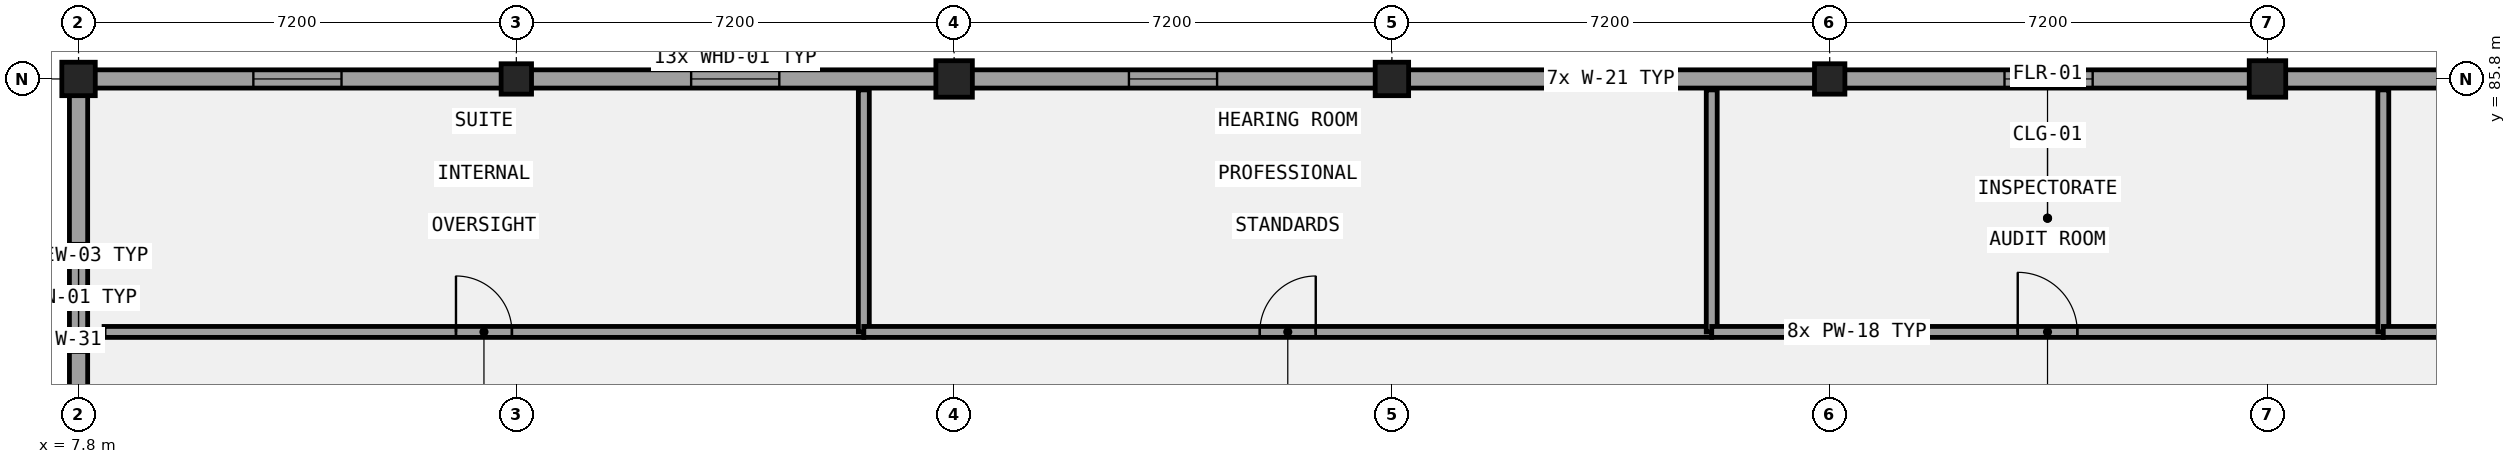
"""IFC4 building model, lengths in metres.
Left out: names, types, materials, properties, quantities, classifications, styles, units other than length and angle.
Written with IfcOpenShell. Run it as: python <this file> out.ifc"""

import sys

from ifc_helpers import new_model, si_unit, direction, frame, frame_2d, origin, origin_2d, place, context, subcontext, project, spatial, rectangle, extrude, element, fill, save


model = new_model("IFC4")
c1 = context("Model", 3, precision=1e-05, world=origin(), true_north=direction((0.0, 1.0)))
c2 = subcontext(c1, "Body", "Model", "MODEL_VIEW")
j1 = project(units=[si_unit("LENGTHUNIT", "METRE"), si_unit("PLANEANGLEUNIT", "RADIAN")], contexts=[c1])
p1 = place(None, origin())
s1 = spatial("IfcSite", under=j1, at=p1, CompositionType="ELEMENT")
p2 = place(p1, origin())
s2 = spatial("IfcBuilding", under=s1, at=p2, CompositionType="ELEMENT")
p3 = place(p2, frame((0.0, 0.0, 22.2)))
s3 = spatial("IfcBuildingStorey", under=s2, at=p3, CompositionType="ELEMENT", Elevation=22.2)
p4 = place(p3, frame((7.8, 85.8, 0.0), z_axis=(0.0, 0.0, 1.0), x_axis=(1.0, 0.0, 0.0)))
e1 = element("IfcColumn", 1, at=p4, inside=s3, PredefinedType="COLUMN", context=c2, shape_type="SweptSolid", body=[
    extrude(rectangle(XDim=0.55, YDim=0.55, at=origin_2d()), origin(), (0.0, 0.0, 1.0), 4.2),
])
p5 = place(p3, frame((15.0, 85.8, 0.0), z_axis=(0.0, 0.0, 1.0), x_axis=(1.0, 0.0, 0.0)))
e2 = element("IfcColumn", 2, at=p5, inside=s3, PredefinedType="COLUMN", context=c2, shape_type="SweptSolid", body=[
    extrude(rectangle(XDim=0.5, YDim=0.5, at=origin_2d()), origin(), (0.0, 0.0, 1.0), 4.2),
])
p6 = place(p3, frame((22.2, 85.8, 0.0), z_axis=(0.0, 0.0, 1.0), x_axis=(1.0, 0.0, 0.0)))
e3 = element("IfcColumn", 3, at=p6, inside=s3, PredefinedType="COLUMN", context=c2, shape_type="SweptSolid", body=[
    extrude(rectangle(XDim=0.6, YDim=0.6, at=origin_2d()), origin(), (0.0, 0.0, 1.0), 4.2),
])
p7 = place(p3, frame((29.4, 85.8, 0.0), z_axis=(0.0, 0.0, 1.0), x_axis=(1.0, 0.0, 0.0)))
e4 = element("IfcColumn", 4, at=p7, inside=s3, PredefinedType="COLUMN", context=c2, shape_type="SweptSolid", body=[
    extrude(rectangle(XDim=0.55, YDim=0.55, at=origin_2d()), origin(), (0.0, 0.0, 1.0), 4.2),
])
p8 = place(p3, frame((36.6, 85.8, 0.0), z_axis=(0.0, 0.0, 1.0), x_axis=(1.0, 0.0, 0.0)))
e5 = element("IfcColumn", 5, at=p8, inside=s3, PredefinedType="COLUMN", context=c2, shape_type="SweptSolid", body=[
    extrude(rectangle(XDim=0.5, YDim=0.5, at=origin_2d()), origin(), (0.0, 0.0, 1.0), 4.2),
])
p9 = place(p3, frame((43.8, 85.8, 0.0), z_axis=(0.0, 0.0, 1.0), x_axis=(1.0, 0.0, 0.0)))
e6 = element("IfcColumn", 6, at=p9, inside=s3, PredefinedType="COLUMN", context=c2, shape_type="SweptSolid", body=[
    extrude(rectangle(XDim=0.6, YDim=0.6, at=origin_2d()), origin(), (0.0, 0.0, 1.0), 4.2),
])
p10 = place(p3, frame((108.75, 85.8, 0.0), z_axis=(0.0, 0.0, 1.0), x_axis=(-1.0, 0.0, 0.0)))
e7 = element("IfcWall", 7, at=p10, inside=s3, PredefinedType="SOLIDWALL", context=c2, shape_type="SweptSolid", body=[
    extrude(rectangle(XDim=101.1, YDim=0.3, at=frame_2d((50.55, 0.0))), origin(), (0.0, 0.0, 1.0), 2.92),
])
p11 = place(p10, frame((96.625, 0.0, 1.0)))
e8 = element("IfcOpeningElement", 8, at=p11, cuts=e7, PredefinedType="OPENING", context=c2, shape_type="SweptSolid", body=[
    extrude(rectangle(XDim=1.45, YDim=1.4, at=frame_2d((0.725, 0.7))), frame((0.0, 0.16, 0.0), z_axis=(0.0, -1.0, 0.0), x_axis=(1.0, 0.0, 0.0)), (0.0, 0.0, 1.0), 0.32),
])
p12 = place(p10, frame((89.425, 0.0, 1.0)))
e9 = element("IfcOpeningElement", 9, at=p12, cuts=e7, PredefinedType="OPENING", context=c2, shape_type="SweptSolid", body=[
    extrude(rectangle(XDim=1.45, YDim=1.4, at=frame_2d((0.725, 0.7))), frame((0.0, 0.16, 0.0), z_axis=(0.0, -1.0, 0.0), x_axis=(1.0, 0.0, 0.0)), (0.0, 0.0, 1.0), 0.32),
])
p13 = place(p10, frame((82.225, 0.0, 1.0)))
e10 = element("IfcOpeningElement", 10, at=p13, cuts=e7, PredefinedType="OPENING", context=c2, shape_type="SweptSolid", body=[
    extrude(rectangle(XDim=1.45, YDim=1.4, at=frame_2d((0.725, 0.7))), frame((0.0, 0.16, 0.0), z_axis=(0.0, -1.0, 0.0), x_axis=(1.0, 0.0, 0.0)), (0.0, 0.0, 1.0), 0.32),
])
p14 = place(p10, frame((75.025, 0.0, 1.0)))
e11 = element("IfcOpeningElement", 11, at=p14, cuts=e7, PredefinedType="OPENING", context=c2, shape_type="SweptSolid", body=[
    extrude(rectangle(XDim=1.45, YDim=1.4, at=frame_2d((0.725, 0.7))), frame((0.0, 0.16, 0.0), z_axis=(0.0, -1.0, 0.0), x_axis=(1.0, 0.0, 0.0)), (0.0, 0.0, 1.0), 0.32),
])
p15 = place(p10, frame((67.825, 0.0, 1.0)))
e12 = element("IfcOpeningElement", 12, at=p15, cuts=e7, PredefinedType="OPENING", context=c2, shape_type="SweptSolid", body=[
    extrude(rectangle(XDim=1.45, YDim=1.4, at=frame_2d((0.725, 0.7))), frame((0.0, 0.16, 0.0), z_axis=(0.0, -1.0, 0.0), x_axis=(1.0, 0.0, 0.0)), (0.0, 0.0, 1.0), 0.32),
])
p16 = place(p10, frame((60.625, 0.0, 1.0)))
e13 = element("IfcOpeningElement", 13, at=p16, cuts=e7, PredefinedType="OPENING", context=c2, shape_type="SweptSolid", body=[
    extrude(rectangle(XDim=1.45, YDim=1.4, at=frame_2d((0.725, 0.7))), frame((0.0, 0.16, 0.0), z_axis=(0.0, -1.0, 0.0), x_axis=(1.0, 0.0, 0.0)), (0.0, 0.0, 1.0), 0.32),
])
p17 = place(p10, frame((53.425, 0.0, 1.0)))
e14 = element("IfcOpeningElement", 14, at=p17, cuts=e7, PredefinedType="OPENING", context=c2, shape_type="SweptSolid", body=[
    extrude(rectangle(XDim=1.45, YDim=1.4, at=frame_2d((0.725, 0.7))), frame((0.0, 0.16, 0.0), z_axis=(0.0, -1.0, 0.0), x_axis=(1.0, 0.0, 0.0)), (0.0, 0.0, 1.0), 0.32),
])
p18 = place(p10, frame((46.225, 0.0, 1.0)))
e15 = element("IfcOpeningElement", 15, at=p18, cuts=e7, PredefinedType="OPENING", context=c2, shape_type="SweptSolid", body=[
    extrude(rectangle(XDim=1.45, YDim=1.4, at=frame_2d((0.725, 0.7))), frame((0.0, 0.16, 0.0), z_axis=(0.0, -1.0, 0.0), x_axis=(1.0, 0.0, 0.0)), (0.0, 0.0, 1.0), 0.32),
])
p19 = place(p10, frame((39.025, 0.0, 1.0)))
e16 = element("IfcOpeningElement", 16, at=p19, cuts=e7, PredefinedType="OPENING", context=c2, shape_type="SweptSolid", body=[
    extrude(rectangle(XDim=1.45, YDim=1.4, at=frame_2d((0.725, 0.7))), frame((0.0, 0.16, 0.0), z_axis=(0.0, -1.0, 0.0), x_axis=(1.0, 0.0, 0.0)), (0.0, 0.0, 1.0), 0.32),
])
p20 = place(p10, frame((31.825, 0.0, 1.0)))
e17 = element("IfcOpeningElement", 17, at=p20, cuts=e7, PredefinedType="OPENING", context=c2, shape_type="SweptSolid", body=[
    extrude(rectangle(XDim=1.45, YDim=1.4, at=frame_2d((0.725, 0.7))), frame((0.0, 0.16, 0.0), z_axis=(0.0, -1.0, 0.0), x_axis=(1.0, 0.0, 0.0)), (0.0, 0.0, 1.0), 0.32),
])
p21 = place(p10, frame((24.625, 0.0, 1.0)))
e18 = element("IfcOpeningElement", 18, at=p21, cuts=e7, PredefinedType="OPENING", context=c2, shape_type="SweptSolid", body=[
    extrude(rectangle(XDim=1.45, YDim=1.4, at=frame_2d((0.725, 0.7))), frame((0.0, 0.16, 0.0), z_axis=(0.0, -1.0, 0.0), x_axis=(1.0, 0.0, 0.0)), (0.0, 0.0, 1.0), 0.32),
])
p22 = place(p10, frame((17.425, 0.0, 1.0)))
e19 = element("IfcOpeningElement", 19, at=p22, cuts=e7, PredefinedType="OPENING", context=c2, shape_type="SweptSolid", body=[
    extrude(rectangle(XDim=1.45, YDim=1.4, at=frame_2d((0.725, 0.7))), frame((0.0, 0.16, 0.0), z_axis=(0.0, -1.0, 0.0), x_axis=(1.0, 0.0, 0.0)), (0.0, 0.0, 1.0), 0.32),
])
p23 = place(p10, frame((10.225, 0.0, 1.0)))
e20 = element("IfcOpeningElement", 20, at=p23, cuts=e7, PredefinedType="OPENING", context=c2, shape_type="SweptSolid", body=[
    extrude(rectangle(XDim=1.45, YDim=1.4, at=frame_2d((0.725, 0.7))), frame((0.0, 0.16, 0.0), z_axis=(0.0, -1.0, 0.0), x_axis=(1.0, 0.0, 0.0)), (0.0, 0.0, 1.0), 0.32),
])
p24 = place(p10, frame((3.025, 0.0, 1.0)))
e21 = element("IfcOpeningElement", 21, at=p24, cuts=e7, PredefinedType="OPENING", context=c2, shape_type="SweptSolid", body=[
    extrude(rectangle(XDim=1.45, YDim=1.4, at=frame_2d((0.725, 0.7))), frame((0.0, 0.16, 0.0), z_axis=(0.0, -1.0, 0.0), x_axis=(1.0, 0.0, 0.0)), (0.0, 0.0, 1.0), 0.32),
])
p25 = place(p3, frame((7.8, 85.65, 0.0), z_axis=(0.0, 0.0, 1.0), x_axis=(0.0, -1.0, 0.0)))
e22 = element("IfcWall", 22, at=p25, inside=s3, PredefinedType="SOLIDWALL", context=c2, shape_type="SweptSolid", body=[
    extrude(rectangle(XDim=6.9, YDim=0.3, at=frame_2d((3.45, 0.0))), origin(), (0.0, 0.0, 1.0), 3.22),
])
p26 = place(p25, frame((2.55, 0.0, 1.0)))
e23 = element("IfcOpeningElement", 23, at=p26, cuts=e22, PredefinedType="OPENING", context=c2, shape_type="SweptSolid", body=[
    extrude(rectangle(XDim=1.8, YDim=1.4, at=frame_2d((0.9, 0.7))), frame((0.0, 0.16, 0.0), z_axis=(0.0, -1.0, 0.0), x_axis=(1.0, 0.0, 0.0)), (0.0, 0.0, 1.0), 0.32),
])
p27 = place(p3, frame((8.22, 81.64, 0.0), z_axis=(0.0, 0.0, 1.0), x_axis=(1.0, 0.0, 0.0)))
e24 = element("IfcWall", 24, at=p27, inside=s3, PredefinedType="PARTITIONING", context=c2, shape_type="SweptSolid", body=[
    extrude(rectangle(XDim=12.495, YDim=0.18, at=frame_2d((6.248, 0.0))), origin(), (0.0, 0.0, 1.0), 3.92),
])
p28 = place(p27, frame((5.788, 0.0, 0.0)))
e25 = element("IfcOpeningElement", 25, at=p28, cuts=e24, PredefinedType="OPENING", context=c2, shape_type="SweptSolid", body=[
    extrude(rectangle(XDim=0.92, YDim=2.22, at=frame_2d((0.46, 1.11))), frame((0.0, 0.1, 0.0), z_axis=(0.0, -1.0, 0.0), x_axis=(1.0, 0.0, 0.0)), (0.0, 0.0, 1.0), 0.2),
])
p29 = place(p3, frame((20.715, 81.64, 0.0), z_axis=(0.0, 0.0, 1.0), x_axis=(0.0, 1.0, 0.0)))
e26 = element("IfcWall", 26, at=p29, inside=s3, PredefinedType="PARTITIONING", context=c2, shape_type="SweptSolid", body=[
    extrude(rectangle(XDim=3.98, YDim=0.18, at=frame_2d((1.99, 0.0))), origin(), (0.0, 0.0, 1.0), 3.92),
])
p30 = place(p3, frame((20.715, 81.64, 0.0), z_axis=(0.0, 0.0, 1.0), x_axis=(1.0, 0.0, 0.0)))
e27 = element("IfcWall", 27, at=p30, inside=s3, PredefinedType="PARTITIONING", context=c2, shape_type="SweptSolid", body=[
    extrude(rectangle(XDim=13.945, YDim=0.18, at=frame_2d((6.972, 0.0))), origin(), (0.0, 0.0, 1.0), 3.92),
])
p31 = place(p30, frame((6.512, 0.0, 0.0)))
e28 = element("IfcOpeningElement", 28, at=p31, cuts=e27, PredefinedType="OPENING", context=c2, shape_type="SweptSolid", body=[
    extrude(rectangle(XDim=0.92, YDim=2.35, at=frame_2d((0.46, 1.175))), frame((0.0, 0.1, 0.0), z_axis=(0.0, -1.0, 0.0), x_axis=(1.0, 0.0, 0.0)), (0.0, 0.0, 1.0), 0.2),
])
p32 = place(p3, frame((34.66, 81.64, 0.0), z_axis=(0.0, 0.0, 1.0), x_axis=(0.0, 1.0, 0.0)))
e29 = element("IfcWall", 29, at=p32, inside=s3, PredefinedType="PARTITIONING", context=c2, shape_type="SweptSolid", body=[
    extrude(rectangle(XDim=3.98, YDim=0.18, at=frame_2d((1.99, 0.0))), origin(), (0.0, 0.0, 1.0), 3.92),
])
p33 = place(p3, frame((34.66, 81.64, 0.0), z_axis=(0.0, 0.0, 1.0), x_axis=(1.0, 0.0, 0.0)))
e30 = element("IfcWall", 30, at=p33, inside=s3, PredefinedType="PARTITIONING", context=c2, shape_type="SweptSolid", body=[
    extrude(rectangle(XDim=11.045, YDim=0.18, at=frame_2d((5.522, 0.0))), origin(), (0.0, 0.0, 1.0), 3.92),
])
p34 = place(p33, frame((5.032, 0.0, 0.0)))
e31 = element("IfcOpeningElement", 31, at=p34, cuts=e30, PredefinedType="OPENING", context=c2, shape_type="SweptSolid", body=[
    extrude(rectangle(XDim=0.98, YDim=2.1, at=frame_2d((0.49, 1.05))), frame((0.0, 0.1, 0.0), z_axis=(0.0, -1.0, 0.0), x_axis=(1.0, 0.0, 0.0)), (0.0, 0.0, 1.0), 0.2),
])
p35 = place(p3, frame((45.705, 81.64, 0.0), z_axis=(0.0, 0.0, 1.0), x_axis=(0.0, 1.0, 0.0)))
e32 = element("IfcWall", 32, at=p35, inside=s3, PredefinedType="PARTITIONING", context=c2, shape_type="SweptSolid", body=[
    extrude(rectangle(XDim=3.98, YDim=0.18, at=frame_2d((1.99, 0.0))), origin(), (0.0, 0.0, 1.0), 3.92),
])
p36 = place(p3, frame((45.705, 81.64, 0.0), z_axis=(0.0, 0.0, 1.0), x_axis=(1.0, 0.0, 0.0)))
e33 = element("IfcWall", 33, at=p36, inside=s3, PredefinedType="PARTITIONING", context=c2, shape_type="SweptSolid", body=[
    extrude(rectangle(XDim=12.495, YDim=0.18, at=frame_2d((6.248, 0.0))), origin(), (0.0, 0.0, 1.0), 3.92),
])
p37 = place(p36, frame((5.758, 0.0, 0.0)))
e34 = element("IfcOpeningElement", 34, at=p37, cuts=e33, PredefinedType="OPENING", context=c2, shape_type="SweptSolid", body=[
    extrude(rectangle(XDim=0.98, YDim=2.22, at=frame_2d((0.49, 1.11))), frame((0.0, 0.1, 0.0), z_axis=(0.0, -1.0, 0.0), x_axis=(1.0, 0.0, 0.0)), (0.0, 0.0, 1.0), 0.2),
])
p38 = place(p11, origin())
e35 = element("IfcWindow", 35, at=p38, inside=s3, PartitioningType="SINGLE_PANEL", PredefinedType="WINDOW", context=c2, shape_type="SweptSolid", body=[
    extrude(rectangle(XDim=1.45, YDim=1.4, at=frame_2d((0.725, 0.7))), frame((0.0, 0.03, 0.0), z_axis=(0.0, -1.0, 0.0), x_axis=(1.0, 0.0, 0.0)), (0.0, 0.0, 1.0), 0.06),
])
fill(e8, e35)
p39 = place(p12, origin())
e36 = element("IfcWindow", 36, at=p39, inside=s3, PartitioningType="SINGLE_PANEL", PredefinedType="WINDOW", context=c2, shape_type="SweptSolid", body=[
    extrude(rectangle(XDim=1.45, YDim=1.4, at=frame_2d((0.725, 0.7))), frame((0.0, 0.03, 0.0), z_axis=(0.0, -1.0, 0.0), x_axis=(1.0, 0.0, 0.0)), (0.0, 0.0, 1.0), 0.06),
])
fill(e9, e36)
p40 = place(p13, origin())
e37 = element("IfcWindow", 37, at=p40, inside=s3, PartitioningType="SINGLE_PANEL", PredefinedType="WINDOW", context=c2, shape_type="SweptSolid", body=[
    extrude(rectangle(XDim=1.45, YDim=1.4, at=frame_2d((0.725, 0.7))), frame((0.0, 0.03, 0.0), z_axis=(0.0, -1.0, 0.0), x_axis=(1.0, 0.0, 0.0)), (0.0, 0.0, 1.0), 0.06),
])
fill(e10, e37)
p41 = place(p14, origin())
e38 = element("IfcWindow", 38, at=p41, inside=s3, PartitioningType="SINGLE_PANEL", PredefinedType="WINDOW", context=c2, shape_type="SweptSolid", body=[
    extrude(rectangle(XDim=1.45, YDim=1.4, at=frame_2d((0.725, 0.7))), frame((0.0, 0.03, 0.0), z_axis=(0.0, -1.0, 0.0), x_axis=(1.0, 0.0, 0.0)), (0.0, 0.0, 1.0), 0.06),
])
fill(e11, e38)
p42 = place(p15, origin())
e39 = element("IfcWindow", 39, at=p42, inside=s3, PartitioningType="SINGLE_PANEL", PredefinedType="WINDOW", context=c2, shape_type="SweptSolid", body=[
    extrude(rectangle(XDim=1.45, YDim=1.4, at=frame_2d((0.725, 0.7))), frame((0.0, 0.03, 0.0), z_axis=(0.0, -1.0, 0.0), x_axis=(1.0, 0.0, 0.0)), (0.0, 0.0, 1.0), 0.06),
])
fill(e12, e39)
p43 = place(p26, origin())
e40 = element("IfcWindow", 40, at=p43, inside=s3, PartitioningType="SINGLE_PANEL", PredefinedType="WINDOW", context=c2, shape_type="SweptSolid", body=[
    extrude(rectangle(XDim=1.8, YDim=1.4, at=frame_2d((0.9, 0.7))), frame((0.0, 0.03, 0.0), z_axis=(0.0, -1.0, 0.0), x_axis=(1.0, 0.0, 0.0)), (0.0, 0.0, 1.0), 0.06),
])
fill(e23, e40)
p44 = place(p28, origin())
e41 = element("IfcDoor", 41, at=p44, inside=s3, OperationType="SINGLE_SWING_LEFT", PredefinedType="DOOR", context=c2, shape_type="SweptSolid", body=[
    extrude(rectangle(XDim=0.92, YDim=2.22, at=frame_2d((0.46, 1.11))), frame((0.0, 0.025, 0.0), z_axis=(0.0, -1.0, 0.0), x_axis=(1.0, 0.0, 0.0)), (0.0, 0.0, 1.0), 0.05),
])
fill(e25, e41)
p45 = place(p31, origin())
e42 = element("IfcDoor", 42, at=p45, inside=s3, OperationType="SINGLE_SWING_RIGHT", PredefinedType="DOOR", context=c2, shape_type="SweptSolid", body=[
    extrude(rectangle(XDim=0.92, YDim=2.35, at=frame_2d((0.46, 1.175))), frame((0.0, 0.025, 0.0), z_axis=(0.0, -1.0, 0.0), x_axis=(1.0, 0.0, 0.0)), (0.0, 0.0, 1.0), 0.05),
])
fill(e28, e42)
p46 = place(p34, origin())
e43 = element("IfcDoor", 43, at=p46, inside=s3, OperationType="SINGLE_SWING_LEFT", PredefinedType="DOOR", context=c2, shape_type="SweptSolid", body=[
    extrude(rectangle(XDim=0.98, YDim=2.1, at=frame_2d((0.49, 1.05))), frame((0.0, 0.025, 0.0), z_axis=(0.0, -1.0, 0.0), x_axis=(1.0, 0.0, 0.0)), (0.0, 0.0, 1.0), 0.05),
])
fill(e31, e43)
save(model, sys.argv[1])
